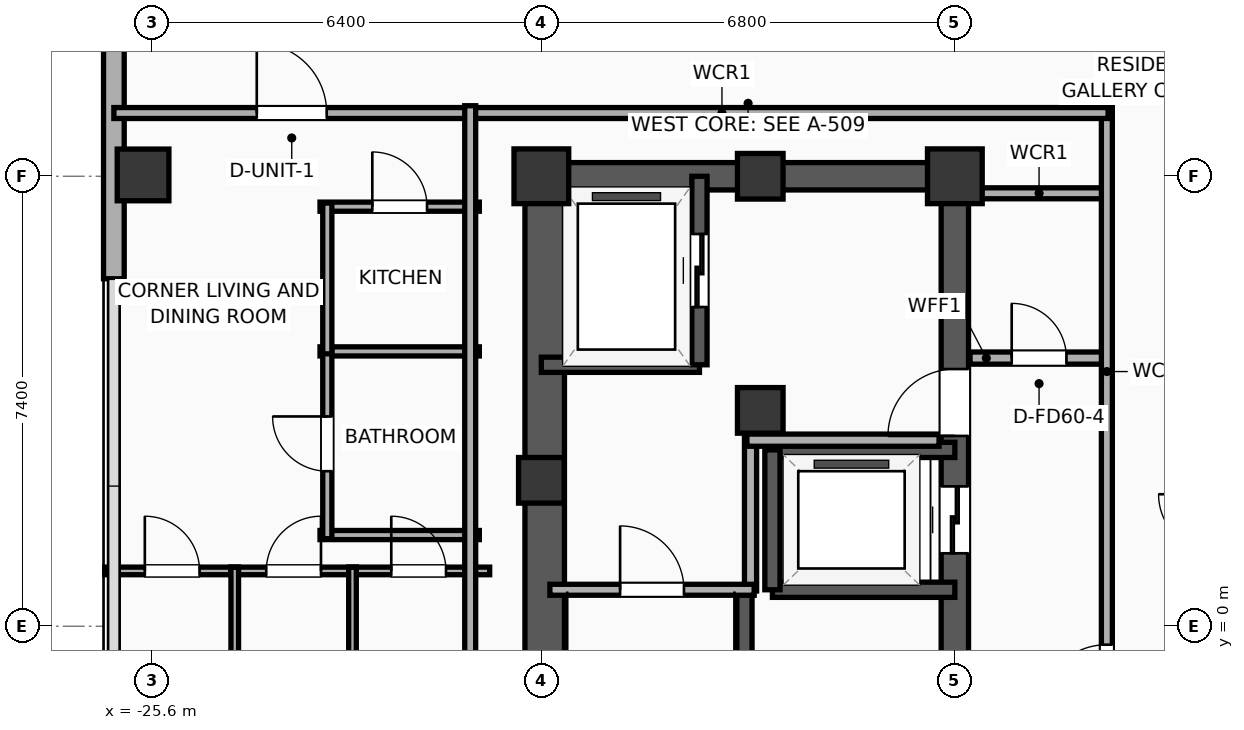
"""IFC4 building model, lengths in metres.
Left out: names, types, materials, properties, quantities, classifications, styles, units other than length and angle.
Written with IfcOpenShell. Run it as: python <this file> out.ifc"""

import sys

from ifc_helpers import new_model, si_unit, direction, frame, frame_2d, origin, origin_2d, place, context, subcontext, project, spatial, rectangle, hollow_rectangle, extrude, element, fill, save


model = new_model("IFC4")
c1 = context("Model", 3, precision=1e-05, world=origin(), true_north=direction((0.0, 1.0)))
c2 = subcontext(c1, "Body", "Model", "MODEL_VIEW")
j1 = project(units=[si_unit("LENGTHUNIT", "METRE"), si_unit("PLANEANGLEUNIT", "RADIAN")], contexts=[c1])
p1 = place(None, origin())
s1 = spatial("IfcSite", under=j1, at=p1, CompositionType="ELEMENT")
p2 = place(p1, origin())
s2 = spatial("IfcBuilding", under=s1, at=p2, CompositionType="ELEMENT")
p3 = place(p2, frame((0.0, 0.0, 211.9)))
s3 = spatial("IfcBuildingStorey", under=s2, at=p3, CompositionType="ELEMENT", Elevation=211.9)
p4 = place(p3, frame((-19.2, 2.4, 0.0), z_axis=(0.0, 0.0, 1.0), x_axis=(1.0, 0.0, 0.0)))
e1 = element("IfcColumn", 1, at=p4, inside=s3, PredefinedType="COLUMN", context=c2, shape_type="SweptSolid", body=[
    extrude(rectangle(XDim=0.75, YDim=0.75, at=origin_2d()), origin(), (0.0, 0.0, 1.0), 3.9),
])
p5 = place(p3, frame((-19.2, 7.4, 0.0), z_axis=(0.0, 0.0, 1.0), x_axis=(1.0, 0.0, 0.0)))
e2 = element("IfcColumn", 2, at=p5, inside=s3, PredefinedType="COLUMN", context=c2, shape_type="SweptSolid", body=[
    extrude(rectangle(XDim=0.9, YDim=0.9, at=origin_2d()), origin(), (0.0, 0.0, 1.0), 3.9),
])
for number, where, z_axis, x_axis in (
    (3, (-15.6, 7.4, 0.0), (0.0, 0.0, 1.0), (1.0, 0.0, 0.0)),
    (4, (-15.6, 3.55, 0.0), (0.0, 0.0, 1.0), (1.0, 0.0, 0.0)),
):
    element("IfcColumn", number, at=place(p3, frame(where, z_axis=z_axis, x_axis=x_axis)), inside=s3, PredefinedType="COLUMN", context=c2, shape_type="SweptSolid", body=[
        extrude(rectangle(XDim=0.75, YDim=0.75, at=origin_2d()), origin(), (0.0, 0.0, 1.0), 3.9),
    ])
p6 = place(p3, frame((-12.4, 7.4, 0.0), z_axis=(0.0, 0.0, 1.0), x_axis=(1.0, 0.0, 0.0)))
e5 = element("IfcColumn", 5, at=p6, inside=s3, PredefinedType="COLUMN", context=c2, shape_type="SweptSolid", body=[
    extrude(rectangle(XDim=0.9, YDim=0.9, at=origin_2d()), origin(), (0.0, 0.0, 1.0), 3.9),
])
p7 = place(p3, frame((-19.425, 7.4, 0.0), z_axis=(0.0, 0.0, 1.0), x_axis=(1.0, 0.0, 0.0)))
e6 = element("IfcWall", 6, at=p7, inside=s3, PredefinedType="SHEAR", context=c2, shape_type="SweptSolid", body=[
    extrude(rectangle(XDim=7.25, YDim=0.45, at=frame_2d((3.625, 0.0))), origin(), (0.0, 0.0, 1.0), 3.65),
])
p8 = place(p3, frame((-19.145, -7.4, 0.0), z_axis=(0.0, 0.0, 1.0), x_axis=(0.0, 1.0, 0.0)))
e7 = element("IfcWall", 7, at=p8, inside=s3, PredefinedType="SHEAR", context=c2, shape_type="SweptSolid", body=[
    extrude(rectangle(XDim=14.8, YDim=0.65, at=frame_2d((7.4, 0.0))), origin(), (0.0, 0.0, 1.0), 3.65),
])
p9 = place(p3, frame((-12.4, -7.4, 0.0), z_axis=(0.0, 0.0, 1.0), x_axis=(0.0, 1.0, 0.0)))
e8 = element("IfcWall", 8, at=p9, inside=s3, PredefinedType="SHEAR", context=c2, shape_type="SweptSolid", body=[
    extrude(rectangle(XDim=14.8, YDim=0.45, at=frame_2d((7.4, 0.0))), origin(), (0.0, 0.0, 1.0), 3.65),
])
p10 = place(p9, frame((8.6, 0.0, 0.0)))
e9 = element("IfcOpeningElement", 9, at=p10, cuts=e8, PredefinedType="OPENING", context=c2, shape_type="SweptSolid", body=[
    extrude(rectangle(XDim=1.1, YDim=2.05, at=frame_2d((0.55, 1.025))), frame((0.0, 0.235, 0.0), z_axis=(0.0, -1.0, 0.0), x_axis=(1.0, 0.0, 0.0)), (0.0, 0.0, 1.0), 0.47),
])
p11 = place(p9, frame((10.53, 0.0, 0.0)))
e10 = element("IfcOpeningElement", 10, at=p11, cuts=e8, PredefinedType="OPENING", context=c2, shape_type="SweptSolid", body=[
    extrude(rectangle(XDim=1.1, YDim=2.05, at=frame_2d((0.55, 1.025))), frame((0.0, 0.235, 0.0), z_axis=(0.0, -1.0, 0.0), x_axis=(1.0, 0.0, 0.0)), (0.0, 0.0, 1.0), 0.47),
])
p12 = place(p9, frame((3.55, 0.0, 0.0)))
e11 = element("IfcOpeningElement", 11, at=p12, cuts=e8, PredefinedType="OPENING", context=c2, shape_type="SweptSolid", body=[
    extrude(rectangle(XDim=0.9, YDim=2.05, at=frame_2d((0.45, 1.025))), frame((0.0, 0.235, 0.0), z_axis=(0.0, -1.0, 0.0), x_axis=(1.0, 0.0, 0.0)), (0.0, 0.0, 1.0), 0.47),
])
p13 = place(p3, frame((-15.86, -7.085, 0.0), z_axis=(0.0, 0.0, 1.0), x_axis=(0.0, 1.0, 0.0)))
e12 = element("IfcWall", 12, at=p13, inside=s3, PredefinedType="SOLIDWALL", context=c2, shape_type="SweptSolid", body=[
    extrude(rectangle(XDim=7.685, YDim=0.25, at=frame_2d((3.843, 0.0))), origin(), (0.0, 0.0, 1.0), 3.65),
])
p14 = place(p3, frame((-25.75, 7.422, 0.0), z_axis=(0.0, 0.0, 1.0), x_axis=(1.0, 0.0, 0.0)))
e13 = element("IfcColumn", 13, at=p14, inside=s3, PredefinedType="COLUMN", context=c2, shape_type="SweptSolid", body=[
    extrude(hollow_rectangle(XDim=0.85, YDim=0.85, WallThickness=0.028, at=origin_2d()), origin(), (0.0, 0.0, 1.0), 3.9),
])
p15 = place(p3, frame((-26.23, 5.715, 0.0), z_axis=(0.0, 0.0, 1.0), x_axis=(0.0, 1.0, 0.0)))
e14 = element("IfcWall", 14, at=p15, inside=s3, PredefinedType="ELEMENTEDWALL", context=c2, shape_type="SweptSolid", body=[
    extrude(rectangle(XDim=10.869, YDim=0.34, at=frame_2d((5.434, 0.0))), origin(), (0.0, 0.0, 1.0), 3.65),
])
p16 = place(p15, frame((4.534, 0.0, 0.75)))
e15 = element("IfcOpeningElement", 15, at=p16, cuts=e14, PredefinedType="OPENING", context=c2, shape_type="SweptSolid", body=[
    extrude(rectangle(XDim=1.8, YDim=2.1, at=frame_2d((0.9, 1.05))), frame((0.0, 0.18, 0.0), z_axis=(0.0, -1.0, 0.0), x_axis=(1.0, 0.0, 0.0)), (0.0, 0.0, 1.0), 0.36),
])
p17 = place(p15, frame((8.167, 0.0, 0.75)))
e16 = element("IfcOpeningElement", 16, at=p17, cuts=e14, PredefinedType="OPENING", context=c2, shape_type="SweptSolid", body=[
    extrude(rectangle(XDim=1.2, YDim=2.05, at=frame_2d((0.6, 1.025))), frame((0.0, 0.18, 0.0), z_axis=(0.0, -1.0, 0.0), x_axis=(1.0, 0.0, 0.0)), (0.0, 0.0, 1.0), 0.36),
])
p18 = place(p3, frame((-19.2, 4.3, 0.0), z_axis=(0.0, 0.0, 1.0), x_axis=(1.0, 0.0, 0.0)))
e17 = element("IfcWall", 17, at=p18, inside=s3, PredefinedType="SOLIDWALL", context=c2, shape_type="SweptSolid", body=[
    extrude(rectangle(XDim=2.6, YDim=0.25, at=frame_2d((1.3, 0.0))), origin(), (0.0, 0.0, 1.0), 3.65),
])
p19 = place(p3, frame((-16.6, 4.3, 0.0), z_axis=(0.0, 0.0, 1.0), x_axis=(0.0, 1.0, 0.0)))
e18 = element("IfcWall", 18, at=p19, inside=s3, PredefinedType="SOLIDWALL", context=c2, shape_type="SweptSolid", body=[
    extrude(rectangle(XDim=3.1, YDim=0.25, at=frame_2d((1.55, 0.0))), origin(), (0.0, 0.0, 1.0), 3.65),
])
p20 = place(p19, frame((0.95, 0.0, 0.0)))
e19 = element("IfcOpeningElement", 19, at=p20, cuts=e18, PredefinedType="OPENING", context=c2, shape_type="SweptSolid", body=[
    extrude(rectangle(XDim=1.2, YDim=2.05, at=frame_2d((0.6, 1.025))), frame((0.0, 0.135, 0.0), z_axis=(0.0, -1.0, 0.0), x_axis=(1.0, 0.0, 0.0)), (0.0, 0.0, 1.0), 0.27),
])
for number, where, z_axis, x_axis in (
    (20, (-15.4, 0.6, 0.0), (0.0, 0.0, 1.0), (1.0, 0.0, 0.0)),
    (21, (-12.4, 2.9, 0.0), (0.0, 0.0, 1.0), (-1.0, 0.0, 0.0)),
):
    element("IfcWall", number, at=place(p3, frame(where, z_axis=z_axis, x_axis=x_axis)), inside=s3, PredefinedType="SOLIDWALL", context=c2, shape_type="SweptSolid", body=[
        extrude(rectangle(XDim=3.0, YDim=0.25, at=frame_2d((1.5, 0.0))), origin(), (0.0, 0.0, 1.0), 3.65),
    ])
p21 = place(p3, frame((-15.4, 2.9, 0.0), z_axis=(0.0, 0.0, 1.0), x_axis=(0.0, -1.0, 0.0)))
e22 = element("IfcWall", 22, at=p21, inside=s3, PredefinedType="SOLIDWALL", context=c2, shape_type="SweptSolid", body=[
    extrude(rectangle(XDim=2.3, YDim=0.25, at=frame_2d((1.15, 0.0))), origin(), (0.0, 0.0, 1.0), 3.65),
])
p22 = place(p3, frame((-15.76, 0.58, 0.0), z_axis=(0.0, 0.0, 1.0), x_axis=(0.0, 1.0, 0.0)))
e23 = element("IfcWall", 23, at=p22, inside=s3, PredefinedType="PARTITIONING", context=c2, shape_type="SweptSolid", body=[
    extrude(rectangle(XDim=2.52, YDim=0.2, at=frame_2d((1.26, 0.0))), origin(), (0.0, 0.0, 1.0), 3.65),
])
p23 = place(p3, frame((-15.82, 3.06, 0.0), z_axis=(0.0, 0.0, 1.0), x_axis=(1.0, 0.0, 0.0)))
e24 = element("IfcWall", 24, at=p23, inside=s3, PredefinedType="PARTITIONING", context=c2, shape_type="SweptSolid", body=[
    extrude(rectangle(XDim=3.16, YDim=0.2, at=frame_2d((1.58, 0.0))), origin(), (0.0, 0.0, 1.0), 3.65),
])
p24 = place(p3, frame((-19.06, 0.6, 0.0), z_axis=(0.0, 0.0, 1.0), x_axis=(1.0, 0.0, 0.0)))
e25 = element("IfcWall", 25, at=p24, inside=s3, PredefinedType="PARTITIONING", context=c2, shape_type="SweptSolid", body=[
    extrude(rectangle(XDim=3.36, YDim=0.18, at=frame_2d((1.68, 0.0))), origin(), (0.0, 0.0, 1.0), 3.65),
])
p25 = place(p24, frame((1.155, 0.0, 0.0)))
e26 = element("IfcOpeningElement", 26, at=p25, cuts=e25, PredefinedType="OPENING", context=c2, shape_type="SweptSolid", body=[
    extrude(rectangle(XDim=1.05, YDim=2.05, at=frame_2d((0.525, 1.025))), frame((0.0, 0.1, 0.0), z_axis=(0.0, -1.0, 0.0), x_axis=(1.0, 0.0, 0.0)), (0.0, 0.0, 1.0), 0.2),
])
p26 = place(p3, frame((-12.15, 4.41, 0.0), z_axis=(0.0, 0.0, 1.0), x_axis=(1.0, 0.0, 0.0)))
e27 = element("IfcWall", 27, at=p26, inside=s3, PredefinedType="PARTITIONING", context=c2, shape_type="SweptSolid", body=[
    extrude(rectangle(XDim=2.27, YDim=0.2, at=frame_2d((1.135, 0.0))), origin(), (0.0, 0.0, 1.0), 3.65),
])
p27 = place(p26, frame((0.685, 0.0, 0.0)))
e28 = element("IfcOpeningElement", 28, at=p27, cuts=e27, PredefinedType="OPENING", context=c2, shape_type="SweptSolid", body=[
    extrude(rectangle(XDim=0.9, YDim=2.05, at=frame_2d((0.45, 1.025))), frame((0.0, 0.11, 0.0), z_axis=(0.0, -1.0, 0.0), x_axis=(1.0, 0.0, 0.0)), (0.0, 0.0, 1.0), 0.22),
])
p28 = place(p3, frame((-12.15, 7.12, 0.0), z_axis=(0.0, 0.0, 1.0), x_axis=(1.0, 0.0, 0.0)))
e29 = element("IfcWall", 29, at=p28, inside=s3, PredefinedType="PARTITIONING", context=c2, shape_type="SweptSolid", body=[
    extrude(rectangle(XDim=2.27, YDim=0.18, at=frame_2d((1.135, 0.0))), origin(), (0.0, 0.0, 1.0), 3.65),
])
p29 = place(p3, frame((-9.9, -8.53, 0.0), z_axis=(0.0, 0.0, 1.0), x_axis=(0.0, 1.0, 0.0)))
e30 = element("IfcWall", 30, at=p29, inside=s3, PredefinedType="PARTITIONING", context=c2, shape_type="SweptSolid", body=[
    extrude(rectangle(XDim=17.06, YDim=0.18, at=frame_2d((8.53, 0.0))), origin(), (0.0, 0.0, 1.0), 3.65),
])
p30 = place(p29, frame((7.127, 0.0, 0.0)))
e31 = element("IfcOpeningElement", 31, at=p30, cuts=e30, PredefinedType="OPENING", context=c2, shape_type="SweptSolid", body=[
    extrude(rectangle(XDim=1.1, YDim=2.05, at=frame_2d((0.55, 1.025))), frame((0.0, 0.1, 0.0), z_axis=(0.0, -1.0, 0.0), x_axis=(1.0, 0.0, 0.0)), (0.0, 0.0, 1.0), 0.2),
])
p31 = place(p3, frame((-26.23, 8.44, 0.0), z_axis=(0.0, 0.0, 1.0), x_axis=(1.0, 0.0, 0.0)))
e32 = element("IfcWall", 32, at=p31, inside=s3, PredefinedType="PARTITIONING", context=c2, shape_type="SweptSolid", body=[
    extrude(rectangle(XDim=16.35, YDim=0.18, at=frame_2d((8.175, 0.0))), origin(), (0.0, 0.0, 1.0), 3.65),
])
p32 = place(p31, frame((2.35, 0.0, 0.0)))
e33 = element("IfcOpeningElement", 33, at=p32, cuts=e32, PredefinedType="OPENING", context=c2, shape_type="SweptSolid", body=[
    extrude(rectangle(XDim=1.15, YDim=2.05, at=frame_2d((0.575, 1.025))), frame((0.0, 0.1, 0.0), z_axis=(0.0, -1.0, 0.0), x_axis=(1.0, 0.0, 0.0)), (0.0, 0.0, 1.0), 0.2),
])
p33 = place(p3, frame((-22.84, 6.9, 0.0), z_axis=(0.0, 0.0, 1.0), x_axis=(1.0, 0.0, 0.0)))
e34 = element("IfcWall", 34, at=p33, inside=s3, PredefinedType="PLUMBINGWALL", context=c2, shape_type="SweptSolid", body=[
    extrude(rectangle(XDim=2.62, YDim=0.15, at=frame_2d((1.31, 0.0))), origin(), (0.0, 0.0, 1.0), 3.65),
])
p34 = place(p33, frame((0.86, 0.0, 0.0)))
e35 = element("IfcOpeningElement", 35, at=p34, cuts=e34, PredefinedType="OPENING", context=c2, shape_type="SweptSolid", body=[
    extrude(rectangle(XDim=0.9, YDim=2.05, at=frame_2d((0.45, 1.025))), frame((0.0, 0.085, 0.0), z_axis=(0.0, -1.0, 0.0), x_axis=(1.0, 0.0, 0.0)), (0.0, 0.0, 1.0), 0.17),
])
for number, where, z_axis, x_axis in (
    (36, (-22.84, 4.52, 0.0), (0.0, 0.0, 1.0), (1.0, 0.0, 0.0)),
    (37, (-22.84, 1.5, 0.0), (0.0, 0.0, 1.0), (1.0, 0.0, 0.0)),
):
    element("IfcWall", number, at=place(p3, frame(where, z_axis=z_axis, x_axis=x_axis)), inside=s3, PredefinedType="PLUMBINGWALL", context=c2, shape_type="SweptSolid", body=[
        extrude(rectangle(XDim=2.62, YDim=0.15, at=frame_2d((1.31, 0.0))), origin(), (0.0, 0.0, 1.0), 3.65),
    ])
p35 = place(p3, frame((-22.72, 1.44, 0.0), z_axis=(0.0, 0.0, 1.0), x_axis=(0.0, 1.0, 0.0)))
e38 = element("IfcWall", 38, at=p35, inside=s3, PredefinedType="PLUMBINGWALL", context=c2, shape_type="SweptSolid", body=[
    extrude(rectangle(XDim=3.12, YDim=0.15, at=frame_2d((1.56, 0.0))), origin(), (0.0, 0.0, 1.0), 3.65),
])
p36 = place(p35, frame((1.11, 0.0, 0.0)))
e39 = element("IfcOpeningElement", 39, at=p36, cuts=e38, PredefinedType="OPENING", context=c2, shape_type="SweptSolid", body=[
    extrude(rectangle(XDim=0.9, YDim=2.05, at=frame_2d((0.45, 1.025))), frame((0.0, 0.085, 0.0), z_axis=(0.0, -1.0, 0.0), x_axis=(1.0, 0.0, 0.0)), (0.0, 0.0, 1.0), 0.17),
])
p37 = place(p3, frame((-22.72, 4.48, 0.0), z_axis=(0.0, 0.0, 1.0), x_axis=(0.0, 1.0, 0.0)))
e40 = element("IfcWall", 40, at=p37, inside=s3, PredefinedType="PLUMBINGWALL", context=c2, shape_type="SweptSolid", body=[
    extrude(rectangle(XDim=2.48, YDim=0.15, at=frame_2d((1.24, 0.0))), origin(), (0.0, 0.0, 1.0), 3.65),
])
p38 = place(p3, frame((-26.38, 0.91, 0.0), z_axis=(0.0, 0.0, 1.0), x_axis=(1.0, 0.0, 0.0)))
e41 = element("IfcWall", 41, at=p38, inside=s3, PredefinedType="PARTITIONING", context=c2, shape_type="SweptSolid", body=[
    extrude(rectangle(XDim=2.2, YDim=0.125, at=frame_2d((1.1, 0.0))), origin(), (0.0, 0.0, 1.0), 3.65),
])
p39 = place(p38, frame((0.659, 0.0, 0.0)))
e42 = element("IfcOpeningElement", 42, at=p39, cuts=e41, PredefinedType="OPENING", context=c2, shape_type="SweptSolid", body=[
    extrude(rectangle(XDim=0.9, YDim=2.05, at=frame_2d((0.45, 1.025))), frame((0.0, 0.073, 0.0), z_axis=(0.0, -1.0, 0.0), x_axis=(1.0, 0.0, 0.0)), (0.0, 0.0, 1.0), 0.145),
])
p40 = place(p3, frame((-24.304, 0.91, 0.0), z_axis=(0.0, 0.0, 1.0), x_axis=(1.0, 0.0, 0.0)))
e43 = element("IfcWall", 43, at=p40, inside=s3, PredefinedType="PARTITIONING", context=c2, shape_type="SweptSolid", body=[
    extrude(rectangle(XDim=2.061, YDim=0.125, at=frame_2d((1.031, 0.0))), origin(), (0.0, 0.0, 1.0), 3.65),
])
p41 = place(p40, frame((0.581, 0.0, 0.0)))
e44 = element("IfcOpeningElement", 44, at=p41, cuts=e43, PredefinedType="OPENING", context=c2, shape_type="SweptSolid", body=[
    extrude(rectangle(XDim=0.9, YDim=2.05, at=frame_2d((0.45, 1.025))), frame((0.0, 0.073, 0.0), z_axis=(0.0, -1.0, 0.0), x_axis=(1.0, 0.0, 0.0)), (0.0, 0.0, 1.0), 0.145),
])
p42 = place(p3, frame((-22.368, 0.91, 0.0), z_axis=(0.0, 0.0, 1.0), x_axis=(1.0, 0.0, 0.0)))
e45 = element("IfcWall", 45, at=p42, inside=s3, PredefinedType="PARTITIONING", context=c2, shape_type="SweptSolid", body=[
    extrude(rectangle(XDim=2.318, YDim=0.125, at=frame_2d((1.159, 0.0))), origin(), (0.0, 0.0, 1.0), 3.65),
])
p43 = place(p42, frame((0.7, 0.0, 0.0)))
e46 = element("IfcOpeningElement", 46, at=p43, cuts=e45, PredefinedType="OPENING", context=c2, shape_type="SweptSolid", body=[
    extrude(rectangle(XDim=0.9, YDim=2.05, at=frame_2d((0.45, 1.025))), frame((0.0, 0.073, 0.0), z_axis=(0.0, -1.0, 0.0), x_axis=(1.0, 0.0, 0.0)), (0.0, 0.0, 1.0), 0.145),
])
for number, where, z_axis, x_axis in (
    (47, (-22.306, -8.76, 0.0), (0.0, 0.0, 1.0), (0.0, 1.0, 0.0)),
    (48, (-24.242, -8.76, 0.0), (0.0, 0.0, 1.0), (0.0, 1.0, 0.0)),
):
    element("IfcWall", number, at=place(p3, frame(where, z_axis=z_axis, x_axis=x_axis)), inside=s3, PredefinedType="PARTITIONING", context=c2, shape_type="SweptSolid", body=[
        extrude(rectangle(XDim=9.73, YDim=0.125, at=frame_2d((4.865, 0.0))), origin(), (0.0, 0.0, 1.0), 3.65),
    ])
p44 = place(p3, frame((-20.37, -8.56, 0.0), z_axis=(0.0, 0.0, 1.0), x_axis=(0.0, 1.0, 0.0)))
e49 = element("IfcWall", 49, at=p44, inside=s3, PredefinedType="PARTITIONING", context=c2, shape_type="SweptSolid", body=[
    extrude(rectangle(XDim=17.12, YDim=0.18, at=frame_2d((8.56, 0.0))), origin(), (0.0, 0.0, 1.0), 3.65),
])
p45 = place(p20, origin())
e50 = element("IfcDoor", 50, at=p45, inside=s3, OperationType="SLIDING_TO_LEFT", PredefinedType="DOOR", context=c2, shape_type="SweptSolid", body=[
    extrude(rectangle(XDim=1.2, YDim=2.05, at=frame_2d((0.6, 1.025))), frame((0.0, 0.025, 0.0), z_axis=(0.0, -1.0, 0.0), x_axis=(1.0, 0.0, 0.0)), (0.0, 0.0, 1.0), 0.05),
])
fill(e19, e50)
p46 = place(p10, origin())
e51 = element("IfcDoor", 51, at=p46, inside=s3, OperationType="SLIDING_TO_LEFT", PredefinedType="DOOR", context=c2, shape_type="SweptSolid", body=[
    extrude(rectangle(XDim=1.1, YDim=2.05, at=frame_2d((0.55, 1.025))), frame((0.0, 0.025, 0.0), z_axis=(0.0, -1.0, 0.0), x_axis=(1.0, 0.0, 0.0)), (0.0, 0.0, 1.0), 0.05),
])
fill(e9, e51)
p47 = place(p25, origin())
e52 = element("IfcDoor", 52, at=p47, inside=s3, OperationType="SINGLE_SWING_LEFT", PredefinedType="DOOR", context=c2, shape_type="SweptSolid", body=[
    extrude(rectangle(XDim=1.05, YDim=2.05, at=frame_2d((0.525, 1.025))), frame((0.0, 0.025, 0.0), z_axis=(0.0, -1.0, 0.0), x_axis=(1.0, 0.0, 0.0)), (0.0, 0.0, 1.0), 0.05),
])
fill(e26, e52)
p48 = place(p27, origin())
e53 = element("IfcDoor", 53, at=p48, inside=s3, OperationType="SINGLE_SWING_LEFT", PredefinedType="DOOR", context=c2, shape_type="SweptSolid", body=[
    extrude(rectangle(XDim=0.9, YDim=2.05, at=frame_2d((0.45, 1.025))), frame((0.0, 0.025, 0.0), z_axis=(0.0, -1.0, 0.0), x_axis=(1.0, 0.0, 0.0)), (0.0, 0.0, 1.0), 0.05),
])
fill(e28, e53)
p49 = place(p30, origin())
e54 = element("IfcDoor", 54, at=p49, inside=s3, OperationType="SINGLE_SWING_LEFT", PredefinedType="DOOR", context=c2, shape_type="SweptSolid", body=[
    extrude(rectangle(XDim=1.1, YDim=2.05, at=frame_2d((0.55, 1.025))), frame((0.0, 0.025, 0.0), z_axis=(0.0, -1.0, 0.0), x_axis=(1.0, 0.0, 0.0)), (0.0, 0.0, 1.0), 0.05),
])
fill(e31, e54)
p50 = place(p32, origin())
e55 = element("IfcDoor", 55, at=p50, inside=s3, OperationType="SINGLE_SWING_LEFT", PredefinedType="DOOR", context=c2, shape_type="SweptSolid", body=[
    extrude(rectangle(XDim=1.15, YDim=2.05, at=frame_2d((0.575, 1.025))), frame((0.0, 0.025, 0.0), z_axis=(0.0, -1.0, 0.0), x_axis=(1.0, 0.0, 0.0)), (0.0, 0.0, 1.0), 0.05),
])
fill(e33, e55)
p51 = place(p34, origin())
e56 = element("IfcDoor", 56, at=p51, inside=s3, OperationType="SINGLE_SWING_LEFT", PredefinedType="DOOR", context=c2, shape_type="SweptSolid", body=[
    extrude(rectangle(XDim=0.9, YDim=2.05, at=frame_2d((0.45, 1.025))), frame((0.0, 0.025, 0.0), z_axis=(0.0, -1.0, 0.0), x_axis=(1.0, 0.0, 0.0)), (0.0, 0.0, 1.0), 0.05),
])
fill(e35, e56)
p52 = place(p36, origin())
e57 = element("IfcDoor", 57, at=p52, inside=s3, OperationType="SINGLE_SWING_RIGHT", PredefinedType="DOOR", context=c2, shape_type="SweptSolid", body=[
    extrude(rectangle(XDim=0.9, YDim=2.05, at=frame_2d((0.45, 1.025))), frame((0.0, 0.025, 0.0), z_axis=(0.0, -1.0, 0.0), x_axis=(1.0, 0.0, 0.0)), (0.0, 0.0, 1.0), 0.05),
])
fill(e39, e57)
p53 = place(p39, origin())
e58 = element("IfcDoor", 58, at=p53, inside=s3, OperationType="SINGLE_SWING_LEFT", PredefinedType="DOOR", context=c2, shape_type="SweptSolid", body=[
    extrude(rectangle(XDim=0.9, YDim=2.05, at=frame_2d((0.45, 1.025))), frame((0.0, 0.025, 0.0), z_axis=(0.0, -1.0, 0.0), x_axis=(1.0, 0.0, 0.0)), (0.0, 0.0, 1.0), 0.05),
])
fill(e42, e58)
p54 = place(p41, origin())
e59 = element("IfcDoor", 59, at=p54, inside=s3, OperationType="SINGLE_SWING_RIGHT", PredefinedType="DOOR", context=c2, shape_type="SweptSolid", body=[
    extrude(rectangle(XDim=0.9, YDim=2.05, at=frame_2d((0.45, 1.025))), frame((0.0, 0.025, 0.0), z_axis=(0.0, -1.0, 0.0), x_axis=(1.0, 0.0, 0.0)), (0.0, 0.0, 1.0), 0.05),
])
fill(e44, e59)
p55 = place(p43, origin())
e60 = element("IfcDoor", 60, at=p55, inside=s3, OperationType="SINGLE_SWING_LEFT", PredefinedType="DOOR", context=c2, shape_type="SweptSolid", body=[
    extrude(rectangle(XDim=0.9, YDim=2.05, at=frame_2d((0.45, 1.025))), frame((0.0, 0.025, 0.0), z_axis=(0.0, -1.0, 0.0), x_axis=(1.0, 0.0, 0.0)), (0.0, 0.0, 1.0), 0.05),
])
fill(e46, e60)
p56 = place(p11, origin())
e61 = element("IfcDoor", 61, at=p56, inside=s3, OperationType="SINGLE_SWING_LEFT", PredefinedType="DOOR", context=c2, shape_type="SweptSolid", body=[
    extrude(rectangle(XDim=1.1, YDim=2.05, at=frame_2d((0.55, 1.025))), frame((0.0, 0.025, 0.0), z_axis=(0.0, -1.0, 0.0), x_axis=(1.0, 0.0, 0.0)), (0.0, 0.0, 1.0), 0.05),
])
fill(e10, e61)
save(model, sys.argv[1])
